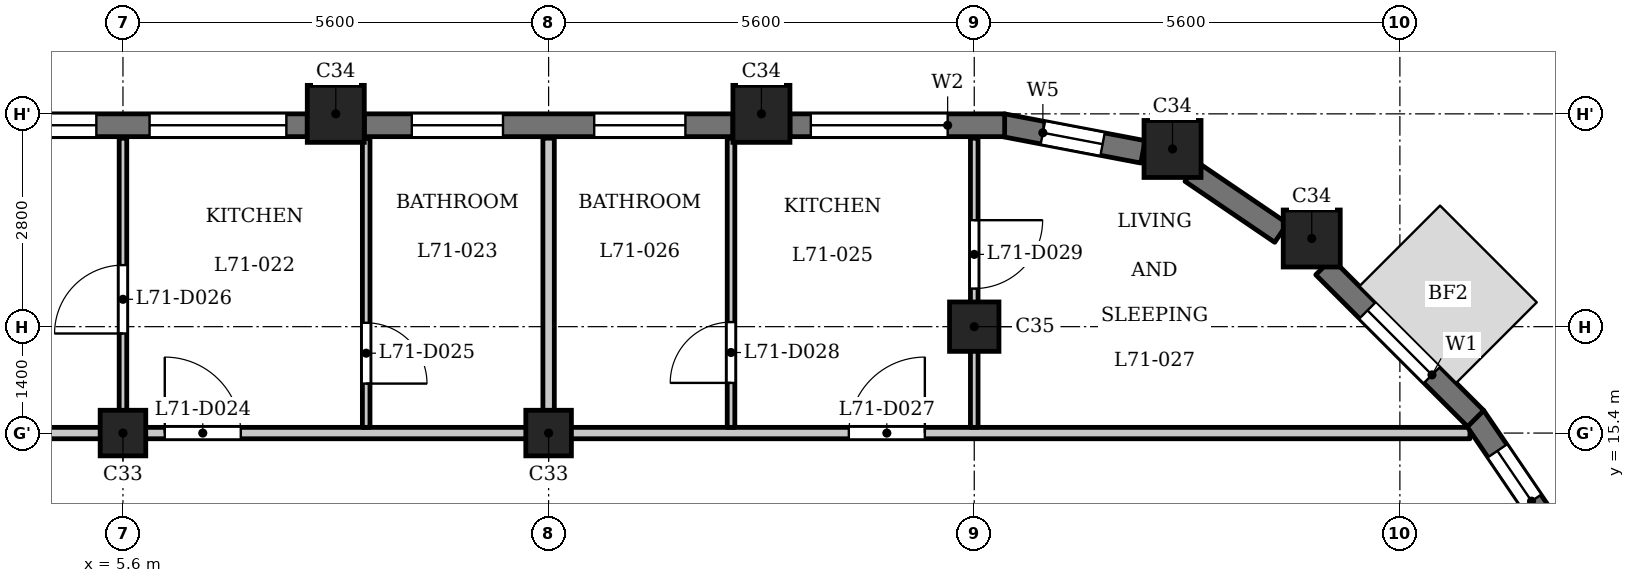
"""IFC4 building model, lengths in metres.
Left out: names, types, materials, properties, quantities, classifications, styles, units other than length and angle.
Written with IfcOpenShell. Run it as: python <this file> out.ifc"""

import sys

from ifc_helpers import new_model, si_unit, direction, frame, frame_2d, origin, origin_2d, place, context, subcontext, project, spatial, rectangle, extrude, element, fill, save


model = new_model("IFC4")
c1 = context("Model", 3, precision=1e-05, world=origin(), true_north=direction((0.0, 1.0)))
c2 = subcontext(c1, "Body", "Model", "MODEL_VIEW")
j1 = project(units=[si_unit("LENGTHUNIT", "METRE"), si_unit("PLANEANGLEUNIT", "RADIAN")], contexts=[c1])
p1 = place(None, origin())
s1 = spatial("IfcSite", under=j1, at=p1, CompositionType="ELEMENT")
p2 = place(p1, origin())
s2 = spatial("IfcBuilding", under=s1, at=p2, CompositionType="ELEMENT")
p3 = place(p2, frame((0.0, 0.0, 273.2)))
s3 = spatial("IfcBuildingStorey", under=s2, at=p3, CompositionType="ELEMENT", Elevation=273.2)
for number, where, z_axis, x_axis in (
    (1, (21.24, 17.96, 0.0), (0.0, 0.0, 1.0), (1.0, 0.0, 0.0)),
    (2, (19.409, 19.138, 0.0), (0.0, 0.0, 1.0), (1.0, 0.0, 0.0)),
    (3, (14.0, 19.6, 0.0), (0.0, 0.0, 1.0), (1.0, 0.0, 0.0)),
    (4, (8.4, 19.6, 0.0), (0.0, 0.0, 1.0), (1.0, 0.0, 0.0)),
):
    element("IfcColumn", number, at=place(p3, frame(where, z_axis=z_axis, x_axis=x_axis)), inside=s3, PredefinedType="COLUMN", context=c2, shape_type="SweptSolid", body=[
        extrude(rectangle(XDim=0.75, YDim=0.75, at=origin_2d()), origin(), (0.0, 0.0, 1.0), 3.5),
    ])
p4 = place(p3, frame((16.8, 16.8, 0.0), z_axis=(0.0, 0.0, 1.0), x_axis=(1.0, 0.0, 0.0)))
e5 = element("IfcColumn", 5, at=p4, inside=s3, PredefinedType="COLUMN", context=c2, shape_type="SweptSolid", body=[
    extrude(rectangle(XDim=0.65, YDim=0.65, at=origin_2d()), origin(), (0.0, 0.0, 1.0), 3.5),
])
for number, where, z_axis, x_axis in (
    (6, (5.6, 15.4, 0.0), (0.0, 0.0, 1.0), (1.0, 0.0, 0.0)),
    (7, (11.2, 15.4, 0.0), (0.0, 0.0, 1.0), (1.0, 0.0, 0.0)),
):
    element("IfcColumn", number, at=place(p3, frame(where, z_axis=z_axis, x_axis=x_axis)), inside=s3, PredefinedType="COLUMN", context=c2, shape_type="SweptSolid", body=[
        extrude(rectangle(XDim=0.6, YDim=0.6, at=origin_2d()), origin(), (0.0, 0.0, 1.0), 3.5),
    ])
p5 = place(p3, frame((24.436, 14.057, 0.0), z_axis=(0.0, 0.0, 1.0), x_axis=(-0.562075713892, 0.827085782645, 0.0)))
e8 = element("IfcWall", 8, at=p5, inside=s3, PredefinedType="SOLIDWALL", context=c2, shape_type="SweptSolid", body=[
    extrude(rectangle(XDim=1.881, YDim=0.3, at=frame_2d((0.94, 0.0))), origin(), (0.0, 0.0, 1.0), 2.55),
])
p6 = place(p5, frame((0.541, 0.0, 0.6)))
e9 = element("IfcOpeningElement", 9, at=p6, cuts=e8, PredefinedType="OPENING", context=c2, shape_type="SweptSolid", body=[
    extrude(rectangle(XDim=0.8, YDim=1.55, at=frame_2d((0.4, 0.775))), frame((0.0, 0.16, 0.0), z_axis=(0.0, -1.0, 0.0), x_axis=(1.0, 0.0, 0.0)), (0.0, 0.0, 1.0), 0.32),
])
p7 = place(p3, frame((23.397, 15.591, 0.0), z_axis=(0.0, 0.0, 1.0), x_axis=(-0.707106781187, 0.707106781187, 0.0)))
e10 = element("IfcWall", 10, at=p7, inside=s3, PredefinedType="SOLIDWALL", context=c2, shape_type="SweptSolid", body=[
    extrude(rectangle(XDim=2.825, YDim=0.3, at=frame_2d((1.413, 0.0))), origin(), (0.0, 0.0, 1.0), 2.55),
])
p8 = place(p7, frame((0.812, 0.0, 0.6)))
e11 = element("IfcOpeningElement", 11, at=p8, cuts=e10, PredefinedType="OPENING", context=c2, shape_type="SweptSolid", body=[
    extrude(rectangle(XDim=1.2, YDim=1.55, at=frame_2d((0.6, 0.775))), frame((0.0, 0.16, 0.0), z_axis=(0.0, -1.0, 0.0), x_axis=(1.0, 0.0, 0.0)), (0.0, 0.0, 1.0), 0.32),
])
p9 = place(p3, frame((20.837, 18.034, 0.0), z_axis=(0.0, 0.0, 1.0), x_axis=(-0.827095130818, 0.562061957952, 0.0)))
e12 = element("IfcWall", 12, at=p9, inside=s3, PredefinedType="SOLIDWALL", context=c2, shape_type="SweptSolid", body=[
    extrude(rectangle(XDim=1.427, YDim=0.3, at=frame_2d((0.713, 0.0))), origin(), (0.0, 0.0, 1.0), 2.55),
])
p10 = place(p3, frame((19.02, 19.1, 0.0), z_axis=(0.0, 0.0, 1.0), x_axis=(-0.982284001233, 0.187398348234, 0.0)))
e13 = element("IfcWall", 13, at=p10, inside=s3, PredefinedType="SOLIDWALL", context=c2, shape_type="SweptSolid", body=[
    extrude(rectangle(XDim=1.881, YDim=0.3, at=frame_2d((0.941, 0.0))), origin(), (0.0, 0.0, 1.0), 2.55),
])
p11 = place(p10, frame((0.541, 0.0, 0.6)))
e14 = element("IfcOpeningElement", 14, at=p11, cuts=e13, PredefinedType="OPENING", context=c2, shape_type="SweptSolid", body=[
    extrude(rectangle(XDim=0.8, YDim=1.55, at=frame_2d((0.4, 0.775))), frame((0.0, 0.16, 0.0), z_axis=(0.0, -1.0, 0.0), x_axis=(1.0, 0.0, 0.0)), (0.0, 0.0, 1.0), 0.32),
])
p12 = place(p3, frame((17.2, 19.45, 0.0), z_axis=(0.0, 0.0, 1.0), x_axis=(-1.0, 0.0, 0.0)))
e15 = element("IfcWall", 15, at=p12, inside=s3, PredefinedType="SOLIDWALL", context=c2, shape_type="SweptSolid", body=[
    extrude(rectangle(XDim=2.825, YDim=0.3, at=frame_2d((1.413, 0.0))), origin(), (0.0, 0.0, 1.0), 2.55),
])
p13 = place(p12, frame((0.75, 0.0, 0.9)))
e16 = element("IfcOpeningElement", 16, at=p13, cuts=e15, PredefinedType="OPENING", context=c2, shape_type="SweptSolid", body=[
    extrude(rectangle(XDim=1.8, YDim=1.25, at=frame_2d((0.9, 0.625))), frame((0.0, 0.16, 0.0), z_axis=(0.0, -1.0, 0.0), x_axis=(1.0, 0.0, 0.0)), (0.0, 0.0, 1.0), 0.32),
])
p14 = place(p3, frame((13.625, 19.45, 0.0), z_axis=(0.0, 0.0, 1.0), x_axis=(-1.0, 0.0, 0.0)))
e17 = element("IfcWall", 17, at=p14, inside=s3, PredefinedType="SOLIDWALL", context=c2, shape_type="SweptSolid", body=[
    extrude(rectangle(XDim=4.85, YDim=0.3, at=frame_2d((2.425, 0.0))), origin(), (0.0, 0.0, 1.0), 2.55),
])
p15 = place(p14, frame((0.625, 0.0, 0.6)))
e18 = element("IfcOpeningElement", 18, at=p15, cuts=e17, PredefinedType="OPENING", context=c2, shape_type="SweptSolid", body=[
    extrude(rectangle(XDim=1.2, YDim=1.55, at=frame_2d((0.6, 0.775))), frame((0.0, 0.16, 0.0), z_axis=(0.0, -1.0, 0.0), x_axis=(1.0, 0.0, 0.0)), (0.0, 0.0, 1.0), 0.32),
])
p16 = place(p14, frame((3.025, 0.0, 0.6)))
e19 = element("IfcOpeningElement", 19, at=p16, cuts=e17, PredefinedType="OPENING", context=c2, shape_type="SweptSolid", body=[
    extrude(rectangle(XDim=1.2, YDim=1.55, at=frame_2d((0.6, 0.775))), frame((0.0, 0.16, 0.0), z_axis=(0.0, -1.0, 0.0), x_axis=(1.0, 0.0, 0.0)), (0.0, 0.0, 1.0), 0.32),
])
p17 = place(p3, frame((8.025, 19.45, 0.0), z_axis=(0.0, 0.0, 1.0), x_axis=(-1.0, 0.0, 0.0)))
e20 = element("IfcWall", 20, at=p17, inside=s3, PredefinedType="SOLIDWALL", context=c2, shape_type="SweptSolid", body=[
    extrude(rectangle(XDim=4.85, YDim=0.3, at=frame_2d((2.425, 0.0))), origin(), (0.0, 0.0, 1.0), 2.55),
])
p18 = place(p17, frame((0.275, 0.0, 0.9)))
e21 = element("IfcOpeningElement", 21, at=p18, cuts=e20, PredefinedType="OPENING", context=c2, shape_type="SweptSolid", body=[
    extrude(rectangle(XDim=1.8, YDim=1.25, at=frame_2d((0.9, 0.625))), frame((0.0, 0.16, 0.0), z_axis=(0.0, -1.0, 0.0), x_axis=(1.0, 0.0, 0.0)), (0.0, 0.0, 1.0), 0.32),
])
p19 = place(p17, frame((2.775, 0.0, 0.9)))
e22 = element("IfcOpeningElement", 22, at=p19, cuts=e20, PredefinedType="OPENING", context=c2, shape_type="SweptSolid", body=[
    extrude(rectangle(XDim=1.8, YDim=1.25, at=frame_2d((0.9, 0.625))), frame((0.0, 0.16, 0.0), z_axis=(0.0, -1.0, 0.0), x_axis=(1.0, 0.0, 0.0)), (0.0, 0.0, 1.0), 0.32),
])
p20 = place(p3, frame((-23.55, 15.4, 0.0), z_axis=(0.0, 0.0, 1.0), x_axis=(1.0, 0.0, 0.0)))
e23 = element("IfcWall", 23, at=p20, inside=s3, PredefinedType="PARTITIONING", context=c2, shape_type="SweptSolid", body=[
    extrude(rectangle(XDim=46.872, YDim=0.15, at=frame_2d((23.436, 0.0))), origin(), (0.0, 0.0, 1.0), 3.2),
])
p21 = place(p20, frame((7.3, 0.0, 0.0)))
e24 = element("IfcOpeningElement", 24, at=p21, cuts=e23, PredefinedType="OPENING", context=c2, shape_type="SweptSolid", body=[
    extrude(rectangle(XDim=1.0, YDim=2.1, at=frame_2d((0.5, 1.05))), frame((0.0, 0.085, 0.0), z_axis=(0.0, -1.0, 0.0), x_axis=(1.0, 0.0, 0.0)), (0.0, 0.0, 1.0), 0.17),
])
p22 = place(p20, frame((16.3, 0.0, 0.0)))
e25 = element("IfcOpeningElement", 25, at=p22, cuts=e23, PredefinedType="OPENING", context=c2, shape_type="SweptSolid", body=[
    extrude(rectangle(XDim=1.0, YDim=2.1, at=frame_2d((0.5, 1.05))), frame((0.0, 0.085, 0.0), z_axis=(0.0, -1.0, 0.0), x_axis=(1.0, 0.0, 0.0)), (0.0, 0.0, 1.0), 0.17),
])
p23 = place(p20, frame((29.7, 0.0, 0.0)))
e26 = element("IfcOpeningElement", 26, at=p23, cuts=e23, PredefinedType="OPENING", context=c2, shape_type="SweptSolid", body=[
    extrude(rectangle(XDim=1.0, YDim=2.1, at=frame_2d((0.5, 1.05))), frame((0.0, 0.085, 0.0), z_axis=(0.0, -1.0, 0.0), x_axis=(1.0, 0.0, 0.0)), (0.0, 0.0, 1.0), 0.17),
])
p24 = place(p20, frame((38.7, 0.0, 0.0)))
e27 = element("IfcOpeningElement", 27, at=p24, cuts=e23, PredefinedType="OPENING", context=c2, shape_type="SweptSolid", body=[
    extrude(rectangle(XDim=1.0, YDim=2.1, at=frame_2d((0.5, 1.05))), frame((0.0, 0.085, 0.0), z_axis=(0.0, -1.0, 0.0), x_axis=(1.0, 0.0, 0.0)), (0.0, 0.0, 1.0), 0.17),
])
p25 = place(p3, frame((5.6, 15.475, 0.0), z_axis=(0.0, 0.0, 1.0), x_axis=(0.0, 1.0, 0.0)))
e28 = element("IfcWall", 28, at=p25, inside=s3, PredefinedType="PARTITIONING", context=c2, shape_type="SweptSolid", body=[
    extrude(rectangle(XDim=3.805, YDim=0.1, at=frame_2d((1.902, 0.0))), origin(), (0.0, 0.0, 1.0), 3.2),
])
p26 = place(p25, frame((1.235, 0.0, 0.0)))
e29 = element("IfcOpeningElement", 29, at=p26, cuts=e28, PredefinedType="OPENING", context=c2, shape_type="SweptSolid", body=[
    extrude(rectangle(XDim=0.9, YDim=2.1, at=frame_2d((0.45, 1.05))), frame((0.0, 0.06, 0.0), z_axis=(0.0, -1.0, 0.0), x_axis=(1.0, 0.0, 0.0)), (0.0, 0.0, 1.0), 0.12),
])
p27 = place(p3, frame((8.8, 15.475, 0.0), z_axis=(0.0, 0.0, 1.0), x_axis=(0.0, 1.0, 0.0)))
e30 = element("IfcWall", 30, at=p27, inside=s3, PredefinedType="PARTITIONING", context=c2, shape_type="SweptSolid", body=[
    extrude(rectangle(XDim=3.805, YDim=0.1, at=frame_2d((1.902, 0.0))), origin(), (0.0, 0.0, 1.0), 3.2),
])
p28 = place(p27, frame((0.576, 0.0, 0.0)))
e31 = element("IfcOpeningElement", 31, at=p28, cuts=e30, PredefinedType="OPENING", context=c2, shape_type="SweptSolid", body=[
    extrude(rectangle(XDim=0.8, YDim=2.1, at=frame_2d((0.4, 1.05))), frame((0.0, 0.06, 0.0), z_axis=(0.0, -1.0, 0.0), x_axis=(1.0, 0.0, 0.0)), (0.0, 0.0, 1.0), 0.12),
])
p29 = place(p3, frame((11.2, 15.475, 0.0), z_axis=(0.0, 0.0, 1.0), x_axis=(0.0, 1.0, 0.0)))
e32 = element("IfcWall", 32, at=p29, inside=s3, PredefinedType="PARTITIONING", context=c2, shape_type="SweptSolid", body=[
    extrude(rectangle(XDim=3.805, YDim=0.15, at=frame_2d((1.902, 0.0))), origin(), (0.0, 0.0, 1.0), 3.2),
])
p30 = place(p3, frame((13.6, 15.475, 0.0), z_axis=(0.0, 0.0, 1.0), x_axis=(0.0, 1.0, 0.0)))
e33 = element("IfcWall", 33, at=p30, inside=s3, PredefinedType="PARTITIONING", context=c2, shape_type="SweptSolid", body=[
    extrude(rectangle(XDim=3.805, YDim=0.1, at=frame_2d((1.902, 0.0))), origin(), (0.0, 0.0, 1.0), 3.2),
])
p31 = place(p30, frame((0.585, 0.0, 0.0)))
e34 = element("IfcOpeningElement", 34, at=p31, cuts=e33, PredefinedType="OPENING", context=c2, shape_type="SweptSolid", body=[
    extrude(rectangle(XDim=0.8, YDim=2.1, at=frame_2d((0.4, 1.05))), frame((0.0, 0.06, 0.0), z_axis=(0.0, -1.0, 0.0), x_axis=(1.0, 0.0, 0.0)), (0.0, 0.0, 1.0), 0.12),
])
p32 = place(p3, frame((16.8, 15.475, 0.0), z_axis=(0.0, 0.0, 1.0), x_axis=(0.0, 1.0, 0.0)))
e35 = element("IfcWall", 35, at=p32, inside=s3, PredefinedType="PARTITIONING", context=c2, shape_type="SweptSolid", body=[
    extrude(rectangle(XDim=3.805, YDim=0.1, at=frame_2d((1.902, 0.0))), origin(), (0.0, 0.0, 1.0), 3.2),
])
p33 = place(p32, frame((1.826, 0.0, 0.0)))
e36 = element("IfcOpeningElement", 36, at=p33, cuts=e35, PredefinedType="OPENING", context=c2, shape_type="SweptSolid", body=[
    extrude(rectangle(XDim=0.9, YDim=2.1, at=frame_2d((0.45, 1.05))), frame((0.0, 0.06, 0.0), z_axis=(0.0, -1.0, 0.0), x_axis=(1.0, 0.0, 0.0)), (0.0, 0.0, 1.0), 0.12),
])
p34 = place(p23, origin())
e37 = element("IfcDoor", 37, at=p34, inside=s3, OperationType="SINGLE_SWING_RIGHT", PredefinedType="DOOR", context=c2, shape_type="SweptSolid", body=[
    extrude(rectangle(XDim=1.0, YDim=2.1, at=frame_2d((0.5, 1.05))), frame((0.0, 0.025, 0.0), z_axis=(0.0, -1.0, 0.0), x_axis=(1.0, 0.0, 0.0)), (0.0, 0.0, 1.0), 0.05),
])
fill(e26, e37)
p35 = place(p28, origin())
e38 = element("IfcDoor", 38, at=p35, inside=s3, OperationType="SINGLE_SWING_LEFT", PredefinedType="DOOR", context=c2, shape_type="SweptSolid", body=[
    extrude(rectangle(XDim=0.8, YDim=2.1, at=frame_2d((0.4, 1.05))), frame((0.0, 0.025, 0.0), z_axis=(0.0, -1.0, 0.0), x_axis=(1.0, 0.0, 0.0)), (0.0, 0.0, 1.0), 0.05),
])
fill(e31, e38)
p36 = place(p26, origin())
e39 = element("IfcDoor", 39, at=p36, inside=s3, OperationType="SINGLE_SWING_RIGHT", PredefinedType="DOOR", context=c2, shape_type="SweptSolid", body=[
    extrude(rectangle(XDim=0.9, YDim=2.1, at=frame_2d((0.45, 1.05))), frame((0.0, 0.025, 0.0), z_axis=(0.0, -1.0, 0.0), x_axis=(1.0, 0.0, 0.0)), (0.0, 0.0, 1.0), 0.05),
])
fill(e29, e39)
p37 = place(p24, origin())
e40 = element("IfcDoor", 40, at=p37, inside=s3, OperationType="SINGLE_SWING_LEFT", PredefinedType="DOOR", context=c2, shape_type="SweptSolid", body=[
    extrude(rectangle(XDim=1.0, YDim=2.1, at=frame_2d((0.5, 1.05))), frame((0.0, 0.025, 0.0), z_axis=(0.0, -1.0, 0.0), x_axis=(1.0, 0.0, 0.0)), (0.0, 0.0, 1.0), 0.05),
])
fill(e27, e40)
p38 = place(p31, origin())
e41 = element("IfcDoor", 41, at=p38, inside=s3, OperationType="SINGLE_SWING_RIGHT", PredefinedType="DOOR", context=c2, shape_type="SweptSolid", body=[
    extrude(rectangle(XDim=0.8, YDim=2.1, at=frame_2d((0.4, 1.05))), frame((0.0, 0.025, 0.0), z_axis=(0.0, -1.0, 0.0), x_axis=(1.0, 0.0, 0.0)), (0.0, 0.0, 1.0), 0.05),
])
fill(e34, e41)
p39 = place(p33, origin())
e42 = element("IfcDoor", 42, at=p39, inside=s3, OperationType="SINGLE_SWING_RIGHT", PredefinedType="DOOR", context=c2, shape_type="SweptSolid", body=[
    extrude(rectangle(XDim=0.9, YDim=2.1, at=frame_2d((0.45, 1.05))), frame((0.0, 0.025, 0.0), z_axis=(0.0, -1.0, 0.0), x_axis=(1.0, 0.0, 0.0)), (0.0, 0.0, 1.0), 0.05),
])
fill(e36, e42)
p40 = place(p6, origin())
e43 = element("IfcWindow", 43, at=p40, inside=s3, PartitioningType="SINGLE_PANEL", PredefinedType="WINDOW", context=c2, shape_type="SweptSolid", body=[
    extrude(rectangle(XDim=0.8, YDim=1.55, at=frame_2d((0.4, 0.775))), frame((0.0, 0.03, 0.0), z_axis=(0.0, -1.0, 0.0), x_axis=(1.0, 0.0, 0.0)), (0.0, 0.0, 1.0), 0.06),
])
fill(e9, e43)
p41 = place(p8, origin())
e44 = element("IfcWindow", 44, at=p41, inside=s3, PartitioningType="SINGLE_PANEL", PredefinedType="WINDOW", context=c2, shape_type="SweptSolid", body=[
    extrude(rectangle(XDim=1.2, YDim=1.55, at=frame_2d((0.6, 0.775))), frame((0.0, 0.03, 0.0), z_axis=(0.0, -1.0, 0.0), x_axis=(1.0, 0.0, 0.0)), (0.0, 0.0, 1.0), 0.06),
])
fill(e11, e44)
p42 = place(p11, origin())
e45 = element("IfcWindow", 45, at=p42, inside=s3, PartitioningType="SINGLE_PANEL", PredefinedType="WINDOW", context=c2, shape_type="SweptSolid", body=[
    extrude(rectangle(XDim=0.8, YDim=1.55, at=frame_2d((0.4, 0.775))), frame((0.0, 0.03, 0.0), z_axis=(0.0, -1.0, 0.0), x_axis=(1.0, 0.0, 0.0)), (0.0, 0.0, 1.0), 0.06),
])
fill(e14, e45)
p43 = place(p13, origin())
e46 = element("IfcWindow", 46, at=p43, inside=s3, PartitioningType="SINGLE_PANEL", PredefinedType="WINDOW", context=c2, shape_type="SweptSolid", body=[
    extrude(rectangle(XDim=1.8, YDim=1.25, at=frame_2d((0.9, 0.625))), frame((0.0, 0.03, 0.0), z_axis=(0.0, -1.0, 0.0), x_axis=(1.0, 0.0, 0.0)), (0.0, 0.0, 1.0), 0.06),
])
fill(e16, e46)
p44 = place(p15, origin())
e47 = element("IfcWindow", 47, at=p44, inside=s3, PartitioningType="SINGLE_PANEL", PredefinedType="WINDOW", context=c2, shape_type="SweptSolid", body=[
    extrude(rectangle(XDim=1.2, YDim=1.55, at=frame_2d((0.6, 0.775))), frame((0.0, 0.03, 0.0), z_axis=(0.0, -1.0, 0.0), x_axis=(1.0, 0.0, 0.0)), (0.0, 0.0, 1.0), 0.06),
])
fill(e18, e47)
p45 = place(p16, origin())
e48 = element("IfcWindow", 48, at=p45, inside=s3, PartitioningType="SINGLE_PANEL", PredefinedType="WINDOW", context=c2, shape_type="SweptSolid", body=[
    extrude(rectangle(XDim=1.2, YDim=1.55, at=frame_2d((0.6, 0.775))), frame((0.0, 0.03, 0.0), z_axis=(0.0, -1.0, 0.0), x_axis=(1.0, 0.0, 0.0)), (0.0, 0.0, 1.0), 0.06),
])
fill(e19, e48)
p46 = place(p18, origin())
e49 = element("IfcWindow", 49, at=p46, inside=s3, PartitioningType="SINGLE_PANEL", PredefinedType="WINDOW", context=c2, shape_type="SweptSolid", body=[
    extrude(rectangle(XDim=1.8, YDim=1.25, at=frame_2d((0.9, 0.625))), frame((0.0, 0.03, 0.0), z_axis=(0.0, -1.0, 0.0), x_axis=(1.0, 0.0, 0.0)), (0.0, 0.0, 1.0), 0.06),
])
fill(e21, e49)
p47 = place(p19, origin())
e50 = element("IfcWindow", 50, at=p47, inside=s3, PartitioningType="SINGLE_PANEL", PredefinedType="WINDOW", context=c2, shape_type="SweptSolid", body=[
    extrude(rectangle(XDim=1.8, YDim=1.25, at=frame_2d((0.9, 0.625))), frame((0.0, 0.03, 0.0), z_axis=(0.0, -1.0, 0.0), x_axis=(1.0, 0.0, 0.0)), (0.0, 0.0, 1.0), 0.06),
])
fill(e22, e50)
save(model, sys.argv[1])
